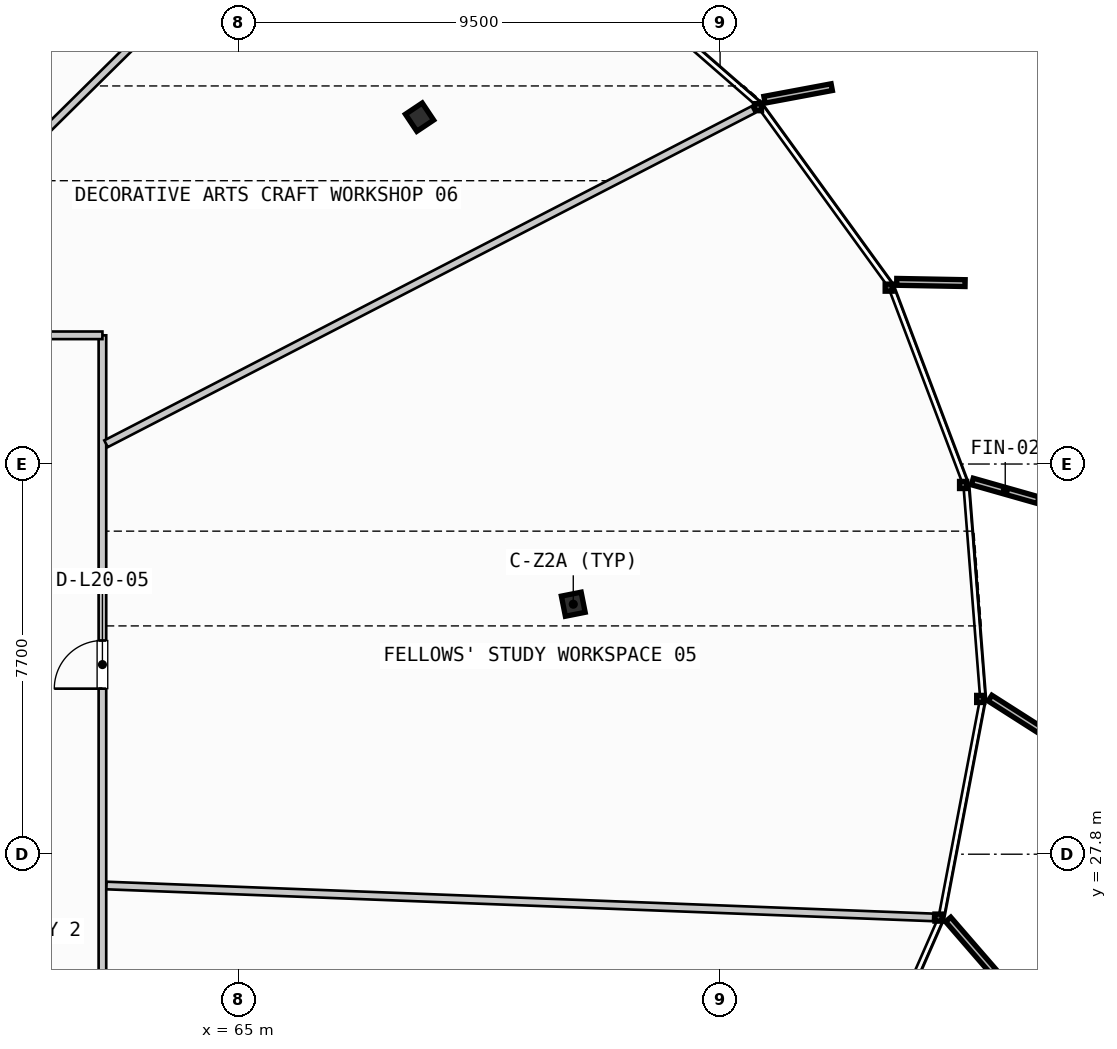
"""IFC4 building model, lengths in metres.
Left out: names, types, materials, properties, quantities, classifications, styles, units other than length and angle.
Written with IfcOpenShell. Run it as: python <this file> out.ifc"""

import sys

from ifc_helpers import new_model, si_unit, direction, frame, frame_2d, origin, origin_2d, place, context, subcontext, project, spatial, rectangle, i_section, extrude, source, transform, mapped, element, fill, save


model = new_model("IFC4")
c1 = context("Model", 3, precision=1e-05, world=origin(), true_north=direction((0.0, 1.0)))
c2 = subcontext(c1, "Body", "Model", "MODEL_VIEW")
j1 = project(units=[si_unit("LENGTHUNIT", "METRE"), si_unit("PLANEANGLEUNIT", "RADIAN")], contexts=[c1])
p1 = place(None, origin())
s1 = spatial("IfcSite", under=j1, at=p1, CompositionType="ELEMENT")
p2 = place(p1, origin())
s2 = spatial("IfcBuilding", under=s1, at=p2, CompositionType="ELEMENT")
p3 = place(p2, frame((0.0, 0.0, 85.6)))
s3 = spatial("IfcBuildingStorey", under=s2, at=p3, CompositionType="ELEMENT", Elevation=85.6)
m1 = source(origin(), c2, "Body", "SweptSolid", [
    extrude(i_section(OverallWidth=0.405, OverallDepth=0.398, WebThickness=0.035, FlangeThickness=0.056, FilletRadius=0.015, at=origin_2d()), origin(), (0.0, 0.0, 1.0), 3.35),
])
for number, where, z_axis, x_axis in (
    (1, (71.603, 32.733, 0.0), (0.0, 0.0, 1.0), (0.981, 0.195, 0.0)),
    (2, (68.569, 42.345, 0.0), (0.0, 0.0, 1.0), (0.831, 0.556, 0.0)),
):
    element("IfcColumn", number, at=place(p3, frame(where, z_axis=z_axis, x_axis=x_axis)), inside=s3, PredefinedType="COLUMN", context=c2, shape_type="MappedRepresentation", body=[
        mapped(m1, transform((0.0, 0.0, 0.0), scale=1.0)),
    ])
p4 = place(p3, frame((62.31, 17.98, 0.0), z_axis=(0.0, 0.0, 1.0), x_axis=(0.0, 1.0, 0.0)))
e3 = element("IfcWall", 3, at=p4, inside=s3, PredefinedType="PARTITIONING", context=c2, shape_type="SweptSolid", body=[
    extrude(rectangle(XDim=20.06, YDim=0.15, at=frame_2d((10.03, 0.0))), origin(), (0.0, 0.0, 1.0), 2.28),
])
p5 = place(p4, frame((4.576, 0.0, 0.0)))
e4 = element("IfcOpeningElement", 4, at=p5, cuts=e3, PredefinedType="OPENING", context=c2, shape_type="SweptSolid", body=[
    extrude(rectangle(XDim=0.95, YDim=2.15, at=frame_2d((0.475, 1.075))), frame((0.0, 0.085, 0.0), z_axis=(0.0, -1.0, 0.0), x_axis=(1.0, 0.0, 0.0)), (0.0, 0.0, 1.0), 0.17),
])
p6 = place(p4, frame((13.087, 0.0, 0.0)))
e5 = element("IfcOpeningElement", 5, at=p6, cuts=e3, PredefinedType="OPENING", context=c2, shape_type="SweptSolid", body=[
    extrude(rectangle(XDim=0.95, YDim=2.15, at=frame_2d((0.475, 1.075))), frame((0.0, 0.085, 0.0), z_axis=(0.0, -1.0, 0.0), x_axis=(1.0, 0.0, 0.0)), (0.0, 0.0, 1.0), 0.17),
])
p7 = place(p3, frame((62.31, 38.04, 0.0), z_axis=(0.0, 0.0, 1.0), x_axis=(-1.0, 0.0, 0.0)))
e6 = element("IfcWall", 6, at=p7, inside=s3, PredefinedType="PARTITIONING", context=c2, shape_type="SweptSolid", body=[
    extrude(rectangle(XDim=31.54, YDim=0.15, at=frame_2d((15.77, 0.0))), origin(), (0.0, 0.0, 1.0), 2.28),
])
p8 = place(p7, frame((2.419, 0.0, 0.0)))
e7 = element("IfcOpeningElement", 7, at=p8, cuts=e6, PredefinedType="OPENING", context=c2, shape_type="SweptSolid", body=[
    extrude(rectangle(XDim=0.95, YDim=2.15, at=frame_2d((0.475, 1.075))), frame((0.0, 0.085, 0.0), z_axis=(0.0, -1.0, 0.0), x_axis=(1.0, 0.0, 0.0)), (0.0, 0.0, 1.0), 0.17),
])
p9 = place(p7, frame((12.199, 0.0, 0.0)))
e8 = element("IfcOpeningElement", 8, at=p9, cuts=e6, PredefinedType="OPENING", context=c2, shape_type="SweptSolid", body=[
    extrude(rectangle(XDim=0.95, YDim=2.15, at=frame_2d((0.475, 1.075))), frame((0.0, 0.085, 0.0), z_axis=(0.0, -1.0, 0.0), x_axis=(1.0, 0.0, 0.0)), (0.0, 0.0, 1.0), 0.17),
])
p10 = place(p7, frame((25.119, 0.0, 0.0)))
e9 = element("IfcOpeningElement", 9, at=p10, cuts=e6, PredefinedType="OPENING", context=c2, shape_type="SweptSolid", body=[
    extrude(rectangle(XDim=0.95, YDim=2.15, at=frame_2d((0.475, 1.075))), frame((0.0, 0.085, 0.0), z_axis=(0.0, -1.0, 0.0), x_axis=(1.0, 0.0, 0.0)), (0.0, 0.0, 1.0), 0.17),
])
p11 = place(p3, frame((62.39, 27.183, 0.0), z_axis=(0.0, 0.0, 1.0), x_axis=(0.999256152386, -0.038563479088, 0.0)))
e10 = element("IfcWall", 10, at=p11, inside=s3, PredefinedType="PARTITIONING", context=c2, shape_type="SweptSolid", body=[
    extrude(rectangle(XDim=16.327, YDim=0.15, at=frame_2d((8.164, 0.0))), origin(), (0.0, 0.0, 1.0), 2.28),
])
p12 = place(p3, frame((62.381, 35.9, 0.0), z_axis=(0.0, 0.0, 1.0), x_axis=(0.888592298941, 0.458697859449, 0.0)))
e11 = element("IfcWall", 11, at=p12, inside=s3, PredefinedType="PARTITIONING", context=c2, shape_type="SweptSolid", body=[
    extrude(rectangle(XDim=14.375, YDim=0.15, at=frame_2d((7.188, 0.0))), origin(), (0.0, 0.0, 1.0), 2.28),
])
p13 = place(p3, frame((57.159, 38.096, 0.0), z_axis=(0.0, 0.0, 1.0), x_axis=(0.711460184379, 0.702726409098, 0.0)))
e12 = element("IfcWall", 12, at=p13, inside=s3, PredefinedType="PARTITIONING", context=c2, shape_type="SweptSolid", body=[
    extrude(rectangle(XDim=14.256, YDim=0.15, at=frame_2d((7.128, 0.0))), origin(), (0.0, 0.0, 1.0), 2.28),
])
m2 = source(origin(), c2, "Body", "SweptSolid", [
    extrude(rectangle(XDim=0.95, YDim=2.15, at=frame_2d((0.475, 1.075))), frame((0.0, 0.025, 0.0), z_axis=(0.0, -1.0, 0.0), x_axis=(1.0, 0.0, 0.0)), (0.0, 0.0, 1.0), 0.05),
])
p14 = place(p6, origin())
e13 = element("IfcDoor", 13, at=p14, inside=s3, OperationType="SINGLE_SWING_LEFT", PredefinedType="DOOR", context=c2, shape_type="MappedRepresentation", body=[
    mapped(m2, transform((0.0, 0.0, 0.0), scale=1.0)),
])
fill(e5, e13)
save(model, sys.argv[1])
